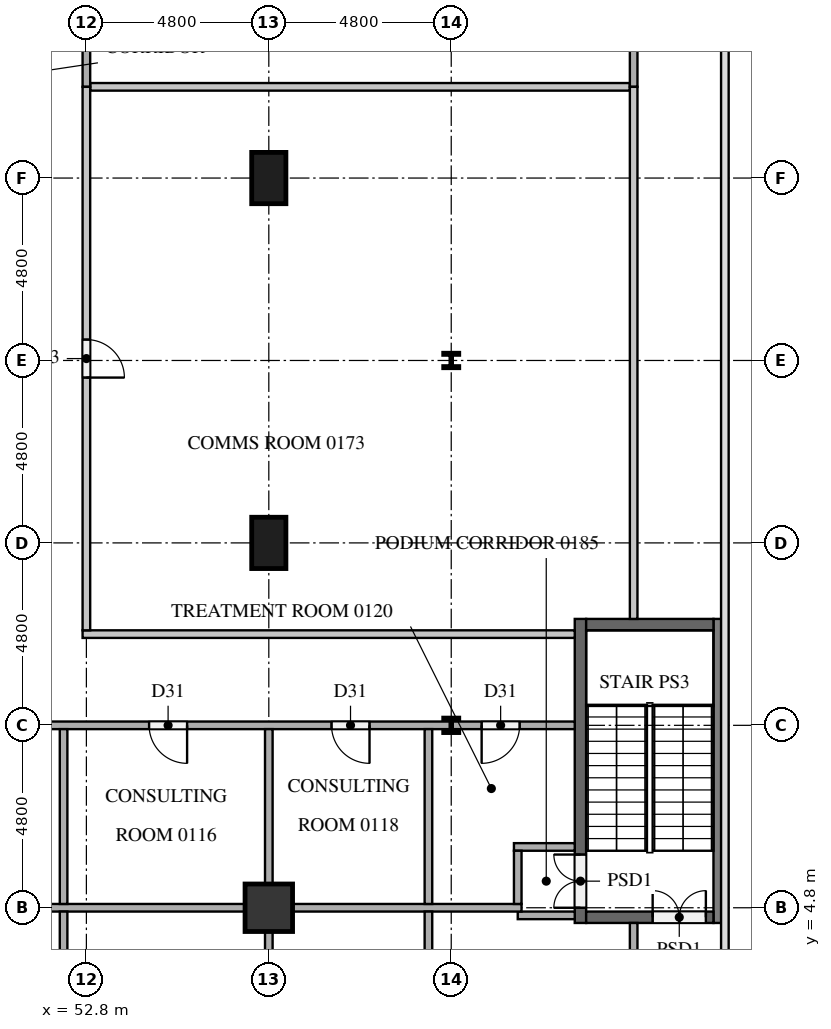
"""IFC4 building model, lengths in metres.
Left out: names, types, materials, properties, quantities, classifications, styles, units other than length and angle.
Written with IfcOpenShell. Run it as: python <this file> out.ifc"""

import sys

from ifc_helpers import new_model, si_unit, direction, frame, frame_2d, origin, origin_2d, place, context, subcontext, project, spatial, rectangle, i_section, extrude, element, fill, save


model = new_model("IFC4")
c1 = context("Model", 3, precision=1e-05, world=origin(), true_north=direction((0.0, 1.0)))
c2 = subcontext(c1, "Body", "Model", "MODEL_VIEW")
j1 = project(units=[si_unit("LENGTHUNIT", "METRE"), si_unit("PLANEANGLEUNIT", "RADIAN")], contexts=[c1])
p1 = place(None, origin())
s1 = spatial("IfcSite", under=j1, at=p1, CompositionType="ELEMENT")
p2 = place(p1, origin())
s2 = spatial("IfcBuilding", under=s1, at=p2, CompositionType="ELEMENT")
p3 = place(p2, frame((0.0, 0.0, 6.0)))
s3 = spatial("IfcBuildingStorey", under=s2, at=p3, CompositionType="ELEMENT", Elevation=6.0)
p4 = place(p3, frame((65.8, 4.4, 0.0), z_axis=(0.0, 0.0, 1.0), x_axis=(0.0, 1.0, 0.0)))
e1 = element("IfcWall", 1, at=p4, inside=s3, PredefinedType="SOLIDWALL", context=c2, shape_type="SweptSolid", body=[
    extrude(rectangle(XDim=8.0, YDim=0.3, at=frame_2d((4.0, 0.0))), origin(), (0.0, 0.0, 1.0), 4.2),
])
p5 = place(p4, frame((0.4, 0.0, 0.0)))
e2 = element("IfcOpeningElement", 2, at=p5, cuts=e1, PredefinedType="OPENING", context=c2, shape_type="SweptSolid", body=[
    extrude(rectangle(XDim=1.4, YDim=2.1, at=frame_2d((0.7, 1.05))), frame((0.0, 0.16, 0.0), z_axis=(0.0, -1.0, 0.0), x_axis=(1.0, 0.0, 0.0)), (0.0, 0.0, 1.0), 0.32),
])
p6 = place(p3, frame((69.45, 4.4, 0.0), z_axis=(0.0, 0.0, 1.0), x_axis=(0.0, 1.0, 0.0)))
e3 = element("IfcWall", 3, at=p6, inside=s3, PredefinedType="SOLIDWALL", context=c2, shape_type="SweptSolid", body=[
    extrude(rectangle(XDim=8.0, YDim=0.3, at=frame_2d((4.0, 0.0))), origin(), (0.0, 0.0, 1.0), 4.2),
])
p7 = place(p3, frame((65.95, 4.55, 0.0), z_axis=(0.0, 0.0, 1.0), x_axis=(1.0, 0.0, 0.0)))
e4 = element("IfcWall", 4, at=p7, inside=s3, PredefinedType="SOLIDWALL", context=c2, shape_type="SweptSolid", body=[
    extrude(rectangle(XDim=3.35, YDim=0.3, at=frame_2d((1.675, 0.0))), origin(), (0.0, 0.0, 1.0), 4.2),
])
p8 = place(p7, frame((1.75, 0.0, 0.0)))
e5 = element("IfcOpeningElement", 5, at=p8, cuts=e4, PredefinedType="OPENING", context=c2, shape_type="SweptSolid", body=[
    extrude(rectangle(XDim=1.4, YDim=2.1, at=frame_2d((0.7, 1.05))), frame((0.0, 0.16, 0.0), z_axis=(0.0, -1.0, 0.0), x_axis=(1.0, 0.0, 0.0)), (0.0, 0.0, 1.0), 0.32),
])
p9 = place(p3, frame((65.95, 12.25, 0.0), z_axis=(0.0, 0.0, 1.0), x_axis=(1.0, 0.0, 0.0)))
e6 = element("IfcWall", 6, at=p9, inside=s3, PredefinedType="SOLIDWALL", context=c2, shape_type="SweptSolid", body=[
    extrude(rectangle(XDim=3.35, YDim=0.3, at=frame_2d((1.675, 0.0))), origin(), (0.0, 0.0, 1.0), 4.2),
])
p10 = place(p3, frame((57.6, 4.8, 0.0), z_axis=(0.0, 0.0, 1.0), x_axis=(1.0, 0.0, 0.0)))
e7 = element("IfcColumn", 7, at=p10, inside=s3, PredefinedType="COLUMN", context=c2, shape_type="SweptSolid", body=[
    extrude(rectangle(XDim=1.25, YDim=1.25, at=origin_2d()), origin(), (0.0, 0.0, 1.0), 4.2),
])
for number, where, z_axis, x_axis in (
    (8, (57.6, 14.4, 0.0), (0.0, 0.0, 1.0), (0.0, 1.0, 0.0)),
    (9, (57.6, 24.0, 0.0), (0.0, 0.0, 1.0), (0.0, 1.0, 0.0)),
):
    element("IfcColumn", number, at=place(p3, frame(where, z_axis=z_axis, x_axis=x_axis)), inside=s3, PredefinedType="COLUMN", context=c2, shape_type="SweptSolid", body=[
        extrude(rectangle(XDim=1.35, YDim=0.9, at=origin_2d()), origin(), (0.0, 0.0, 1.0), 4.2),
    ])
for number, where, z_axis, x_axis in (
    (10, (62.4, 9.6, 0.0), (0.0, 0.0, 1.0), (1.0, 0.0, 0.0)),
    (11, (62.4, 19.2, 0.0), (0.0, 0.0, 1.0), (1.0, 0.0, 0.0)),
):
    element("IfcColumn", number, at=place(p3, frame(where, z_axis=z_axis, x_axis=x_axis)), inside=s3, PredefinedType="COLUMN", context=c2, shape_type="SweptSolid", body=[
        extrude(i_section(OverallWidth=0.396, OverallDepth=0.381, WebThickness=0.019, FlangeThickness=0.03, at=origin_2d()), origin(), (0.0, 0.0, 1.0), 4.2),
    ])
p11 = place(p3, frame((64.15, 4.6, 0.0), z_axis=(0.0, 0.0, 1.0), x_axis=(1.0, 0.0, 0.0)))
e12 = element("IfcWall", 12, at=p11, inside=s3, PredefinedType="PARTITIONING", context=c2, shape_type="SweptSolid", body=[
    extrude(rectangle(XDim=1.5, YDim=0.2, at=frame_2d((0.75, 0.0))), origin(), (0.0, 0.0, 1.0), 4.2),
])
p12 = place(p3, frame((33.1, 4.8, 0.0), z_axis=(0.0, 0.0, 1.0), x_axis=(1.0, 0.0, 0.0)))
e13 = element("IfcWall", 13, at=p12, inside=s3, PredefinedType="PARTITIONING", context=c2, shape_type="SweptSolid", body=[
    extrude(rectangle(XDim=31.15, YDim=0.2, at=frame_2d((15.575, 0.0))), origin(), (0.0, 0.0, 1.0), 4.2),
])
p13 = place(p3, frame((64.05, 6.4, 0.0), z_axis=(0.0, 0.0, 1.0), x_axis=(1.0, 0.0, 0.0)))
e14 = element("IfcWall", 14, at=p13, inside=s3, PredefinedType="PARTITIONING", context=c2, shape_type="SweptSolid", body=[
    extrude(rectangle(XDim=1.6, YDim=0.2, at=frame_2d((0.8, 0.0))), origin(), (0.0, 0.0, 1.0), 4.2),
])
p14 = place(p3, frame((65.65, 9.6, 0.0), z_axis=(0.0, 0.0, 1.0), x_axis=(-1.0, 0.0, 0.0)))
e15 = element("IfcWall", 15, at=p14, inside=s3, PredefinedType="PARTITIONING", context=c2, shape_type="SweptSolid", body=[
    extrude(rectangle(XDim=32.75, YDim=0.2, at=frame_2d((16.375, 0.0))), origin(), (0.0, 0.0, 1.0), 4.2),
])
p15 = place(p14, frame((25.0, 0.0, 0.0)))
e16 = element("IfcOpeningElement", 16, at=p15, cuts=e15, PredefinedType="OPENING", context=c2, shape_type="SweptSolid", body=[
    extrude(rectangle(XDim=1.0, YDim=2.1, at=frame_2d((0.5, 1.05))), frame((0.0, 0.11, 0.0), z_axis=(0.0, -1.0, 0.0), x_axis=(1.0, 0.0, 0.0)), (0.0, 0.0, 1.0), 0.22),
])
p16 = place(p14, frame((20.1, 0.0, 0.0)))
e17 = element("IfcOpeningElement", 17, at=p16, cuts=e15, PredefinedType="OPENING", context=c2, shape_type="SweptSolid", body=[
    extrude(rectangle(XDim=1.0, YDim=2.1, at=frame_2d((0.5, 1.05))), frame((0.0, 0.11, 0.0), z_axis=(0.0, -1.0, 0.0), x_axis=(1.0, 0.0, 0.0)), (0.0, 0.0, 1.0), 0.22),
])
p17 = place(p14, frame((15.4, 0.0, 0.0)))
e18 = element("IfcOpeningElement", 18, at=p17, cuts=e15, PredefinedType="OPENING", context=c2, shape_type="SweptSolid", body=[
    extrude(rectangle(XDim=1.0, YDim=2.1, at=frame_2d((0.5, 1.05))), frame((0.0, 0.11, 0.0), z_axis=(0.0, -1.0, 0.0), x_axis=(1.0, 0.0, 0.0)), (0.0, 0.0, 1.0), 0.22),
])
p18 = place(p14, frame((10.2, 0.0, 0.0)))
e19 = element("IfcOpeningElement", 19, at=p18, cuts=e15, PredefinedType="OPENING", context=c2, shape_type="SweptSolid", body=[
    extrude(rectangle(XDim=1.0, YDim=2.1, at=frame_2d((0.5, 1.05))), frame((0.0, 0.11, 0.0), z_axis=(0.0, -1.0, 0.0), x_axis=(1.0, 0.0, 0.0)), (0.0, 0.0, 1.0), 0.22),
])
p19 = place(p14, frame((5.4, 0.0, 0.0)))
e20 = element("IfcOpeningElement", 20, at=p19, cuts=e15, PredefinedType="OPENING", context=c2, shape_type="SweptSolid", body=[
    extrude(rectangle(XDim=1.0, YDim=2.1, at=frame_2d((0.5, 1.05))), frame((0.0, 0.11, 0.0), z_axis=(0.0, -1.0, 0.0), x_axis=(1.0, 0.0, 0.0)), (0.0, 0.0, 1.0), 0.22),
])
p20 = place(p14, frame((1.45, 0.0, 0.0)))
e21 = element("IfcOpeningElement", 21, at=p20, cuts=e15, PredefinedType="OPENING", context=c2, shape_type="SweptSolid", body=[
    extrude(rectangle(XDim=1.0, YDim=2.1, at=frame_2d((0.5, 1.05))), frame((0.0, 0.11, 0.0), z_axis=(0.0, -1.0, 0.0), x_axis=(1.0, 0.0, 0.0)), (0.0, 0.0, 1.0), 0.22),
])
p21 = place(p3, frame((52.7, 12.0, 0.0), z_axis=(0.0, 0.0, 1.0), x_axis=(1.0, 0.0, 0.0)))
e22 = element("IfcWall", 22, at=p21, inside=s3, PredefinedType="PARTITIONING", context=c2, shape_type="SweptSolid", body=[
    extrude(rectangle(XDim=12.95, YDim=0.2, at=frame_2d((6.475, 0.0))), origin(), (0.0, 0.0, 1.0), 4.2),
])
p22 = place(p3, frame((52.9, 26.4, 0.0), z_axis=(0.0, 0.0, 1.0), x_axis=(1.0, 0.0, 0.0)))
e23 = element("IfcWall", 23, at=p22, inside=s3, PredefinedType="PARTITIONING", context=c2, shape_type="SweptSolid", body=[
    extrude(rectangle(XDim=14.2, YDim=0.2, at=frame_2d((7.1, 0.0))), origin(), (0.0, 0.0, 1.0), 4.2),
])
p23 = place(p3, frame((52.2, 0.1, 0.0), z_axis=(0.0, 0.0, 1.0), x_axis=(0.0, 1.0, 0.0)))
e24 = element("IfcWall", 24, at=p23, inside=s3, PredefinedType="PARTITIONING", context=c2, shape_type="SweptSolid", body=[
    extrude(rectangle(XDim=4.6, YDim=0.2, at=frame_2d((2.3, 0.0))), origin(), (0.0, 0.0, 1.0), 4.2),
])
p24 = place(p3, frame((52.2, 4.9, 0.0), z_axis=(0.0, 0.0, 1.0), x_axis=(0.0, 1.0, 0.0)))
e25 = element("IfcWall", 25, at=p24, inside=s3, PredefinedType="PARTITIONING", context=c2, shape_type="SweptSolid", body=[
    extrude(rectangle(XDim=4.6, YDim=0.2, at=frame_2d((2.3, 0.0))), origin(), (0.0, 0.0, 1.0), 4.2),
])
p25 = place(p3, frame((52.8, 40.7, 0.0), z_axis=(0.0, 0.0, 1.0), x_axis=(0.0, -1.0, 0.0)))
e26 = element("IfcWall", 26, at=p25, inside=s3, PredefinedType="PARTITIONING", context=c2, shape_type="SweptSolid", body=[
    extrude(rectangle(XDim=14.3, YDim=0.2, at=frame_2d((7.15, 0.0))), origin(), (0.0, 0.0, 1.0), 4.2),
])
p26 = place(p25, frame((10.25, 0.0, 0.0)))
e27 = element("IfcOpeningElement", 27, at=p26, cuts=e26, PredefinedType="OPENING", context=c2, shape_type="SweptSolid", body=[
    extrude(rectangle(XDim=1.0, YDim=2.1, at=frame_2d((0.5, 1.05))), frame((0.0, 0.11, 0.0), z_axis=(0.0, -1.0, 0.0), x_axis=(1.0, 0.0, 0.0)), (0.0, 0.0, 1.0), 0.22),
])
p27 = place(p3, frame((52.8, 26.4, 0.0), z_axis=(0.0, 0.0, 1.0), x_axis=(0.0, -1.0, 0.0)))
e28 = element("IfcWall", 28, at=p27, inside=s3, PredefinedType="PARTITIONING", context=c2, shape_type="SweptSolid", body=[
    extrude(rectangle(XDim=14.3, YDim=0.2, at=frame_2d((7.15, 0.0))), origin(), (0.0, 0.0, 1.0), 4.2),
])
p28 = place(p27, frame((6.65, 0.0, 0.0)))
e29 = element("IfcOpeningElement", 29, at=p28, cuts=e28, PredefinedType="OPENING", context=c2, shape_type="SweptSolid", body=[
    extrude(rectangle(XDim=1.0, YDim=2.1, at=frame_2d((0.5, 1.05))), frame((0.0, 0.11, 0.0), z_axis=(0.0, -1.0, 0.0), x_axis=(1.0, 0.0, 0.0)), (0.0, 0.0, 1.0), 0.22),
])
p29 = place(p3, frame((57.6, 0.1, 0.0), z_axis=(0.0, 0.0, 1.0), x_axis=(0.0, 1.0, 0.0)))
e30 = element("IfcWall", 30, at=p29, inside=s3, PredefinedType="PARTITIONING", context=c2, shape_type="SweptSolid", body=[
    extrude(rectangle(XDim=4.6, YDim=0.2, at=frame_2d((2.3, 0.0))), origin(), (0.0, 0.0, 1.0), 4.2),
])
p30 = place(p3, frame((57.6, 4.9, 0.0), z_axis=(0.0, 0.0, 1.0), x_axis=(0.0, 1.0, 0.0)))
e31 = element("IfcWall", 31, at=p30, inside=s3, PredefinedType="PARTITIONING", context=c2, shape_type="SweptSolid", body=[
    extrude(rectangle(XDim=4.6, YDim=0.2, at=frame_2d((2.3, 0.0))), origin(), (0.0, 0.0, 1.0), 4.2),
])
p31 = place(p3, frame((61.8, 0.1, 0.0), z_axis=(0.0, 0.0, 1.0), x_axis=(0.0, 1.0, 0.0)))
e32 = element("IfcWall", 32, at=p31, inside=s3, PredefinedType="PARTITIONING", context=c2, shape_type="SweptSolid", body=[
    extrude(rectangle(XDim=4.6, YDim=0.2, at=frame_2d((2.3, 0.0))), origin(), (0.0, 0.0, 1.0), 4.2),
])
p32 = place(p3, frame((61.8, 4.9, 0.0), z_axis=(0.0, 0.0, 1.0), x_axis=(0.0, 1.0, 0.0)))
e33 = element("IfcWall", 33, at=p32, inside=s3, PredefinedType="PARTITIONING", context=c2, shape_type="SweptSolid", body=[
    extrude(rectangle(XDim=4.6, YDim=0.2, at=frame_2d((2.3, 0.0))), origin(), (0.0, 0.0, 1.0), 4.2),
])
p33 = place(p3, frame((64.15, 4.9, 0.0), z_axis=(0.0, 0.0, 1.0), x_axis=(0.0, 1.0, 0.0)))
e34 = element("IfcWall", 34, at=p33, inside=s3, PredefinedType="PARTITIONING", context=c2, shape_type="SweptSolid", body=[
    extrude(rectangle(XDim=1.4, YDim=0.2, at=frame_2d((0.7, 0.0))), origin(), (0.0, 0.0, 1.0), 4.2),
])
p34 = place(p3, frame((67.2, 0.1, 0.0), z_axis=(0.0, 0.0, 1.0), x_axis=(0.0, 1.0, 0.0)))
e35 = element("IfcWall", 35, at=p34, inside=s3, PredefinedType="PARTITIONING", context=c2, shape_type="SweptSolid", body=[
    extrude(rectangle(XDim=4.3, YDim=0.2, at=frame_2d((2.15, 0.0))), origin(), (0.0, 0.0, 1.0), 4.2),
])
p35 = place(p34, frame((1.65, 0.0, 0.0)))
e36 = element("IfcOpeningElement", 36, at=p35, cuts=e35, PredefinedType="OPENING", context=c2, shape_type="SweptSolid", body=[
    extrude(rectangle(XDim=1.0, YDim=2.1, at=frame_2d((0.5, 1.05))), frame((0.0, 0.11, 0.0), z_axis=(0.0, -1.0, 0.0), x_axis=(1.0, 0.0, 0.0)), (0.0, 0.0, 1.0), 0.22),
])
p36 = place(p3, frame((67.2, 26.4, 0.0), z_axis=(0.0, 0.0, 1.0), x_axis=(0.0, 1.0, 0.0)))
e37 = element("IfcWall", 37, at=p36, inside=s3, PredefinedType="PARTITIONING", context=c2, shape_type="SweptSolid", body=[
    extrude(rectangle(XDim=14.3, YDim=0.2, at=frame_2d((7.15, 0.0))), origin(), (0.0, 0.0, 1.0), 4.2),
])
p37 = place(p36, frame((10.25, 0.0, 0.0)))
e38 = element("IfcOpeningElement", 38, at=p37, cuts=e37, PredefinedType="OPENING", context=c2, shape_type="SweptSolid", body=[
    extrude(rectangle(XDim=1.0, YDim=2.1, at=frame_2d((0.5, 1.05))), frame((0.0, 0.11, 0.0), z_axis=(0.0, -1.0, 0.0), x_axis=(1.0, 0.0, 0.0)), (0.0, 0.0, 1.0), 0.22),
])
p38 = place(p3, frame((67.2, 12.4, 0.0), z_axis=(0.0, 0.0, 1.0), x_axis=(0.0, 1.0, 0.0)))
e39 = element("IfcWall", 39, at=p38, inside=s3, PredefinedType="PARTITIONING", context=c2, shape_type="SweptSolid", body=[
    extrude(rectangle(XDim=14.0, YDim=0.2, at=frame_2d((7.0, 0.0))), origin(), (0.0, 0.0, 1.0), 4.2),
])
p39 = place(p5, frame((1.4, 0.0, 0.0), z_axis=(0.0, 0.0, 1.0), x_axis=(-1.0, 0.0, 0.0)))
e40 = element("IfcDoor", 40, at=p39, inside=s3, OperationType="DOUBLE_DOOR_SINGLE_SWING", PredefinedType="DOOR", context=c2, shape_type="SweptSolid", body=[
    extrude(rectangle(XDim=1.4, YDim=2.1, at=frame_2d((0.7, 1.05))), frame((0.0, 0.025, 0.0), z_axis=(0.0, -1.0, 0.0), x_axis=(1.0, 0.0, 0.0)), (0.0, 0.0, 1.0), 0.05),
])
fill(e2, e40)
p40 = place(p8, origin())
e41 = element("IfcDoor", 41, at=p40, inside=s3, OperationType="DOUBLE_DOOR_SINGLE_SWING", PredefinedType="DOOR", context=c2, shape_type="SweptSolid", body=[
    extrude(rectangle(XDim=1.4, YDim=2.1, at=frame_2d((0.7, 1.05))), frame((0.0, 0.025, 0.0), z_axis=(0.0, -1.0, 0.0), x_axis=(1.0, 0.0, 0.0)), (0.0, 0.0, 1.0), 0.05),
])
fill(e5, e41)
p41 = place(p18, origin())
e42 = element("IfcDoor", 42, at=p41, inside=s3, OperationType="SINGLE_SWING_LEFT", PredefinedType="DOOR", context=c2, shape_type="SweptSolid", body=[
    extrude(rectangle(XDim=1.0, YDim=2.1, at=frame_2d((0.5, 1.05))), frame((0.0, 0.025, 0.0), z_axis=(0.0, -1.0, 0.0), x_axis=(1.0, 0.0, 0.0)), (0.0, 0.0, 1.0), 0.05),
])
fill(e19, e42)
p42 = place(p19, origin())
e43 = element("IfcDoor", 43, at=p42, inside=s3, OperationType="SINGLE_SWING_LEFT", PredefinedType="DOOR", context=c2, shape_type="SweptSolid", body=[
    extrude(rectangle(XDim=1.0, YDim=2.1, at=frame_2d((0.5, 1.05))), frame((0.0, 0.025, 0.0), z_axis=(0.0, -1.0, 0.0), x_axis=(1.0, 0.0, 0.0)), (0.0, 0.0, 1.0), 0.05),
])
fill(e20, e43)
p43 = place(p20, origin())
e44 = element("IfcDoor", 44, at=p43, inside=s3, OperationType="SINGLE_SWING_RIGHT", PredefinedType="DOOR", context=c2, shape_type="SweptSolid", body=[
    extrude(rectangle(XDim=1.0, YDim=2.1, at=frame_2d((0.5, 1.05))), frame((0.0, 0.025, 0.0), z_axis=(0.0, -1.0, 0.0), x_axis=(1.0, 0.0, 0.0)), (0.0, 0.0, 1.0), 0.05),
])
fill(e21, e44)
p44 = place(p28, origin())
e45 = element("IfcDoor", 45, at=p44, inside=s3, OperationType="SINGLE_SWING_RIGHT", PredefinedType="DOOR", context=c2, shape_type="SweptSolid", body=[
    extrude(rectangle(XDim=1.0, YDim=2.1, at=frame_2d((0.5, 1.05))), frame((0.0, 0.025, 0.0), z_axis=(0.0, -1.0, 0.0), x_axis=(1.0, 0.0, 0.0)), (0.0, 0.0, 1.0), 0.05),
])
fill(e29, e45)
save(model, sys.argv[1])
